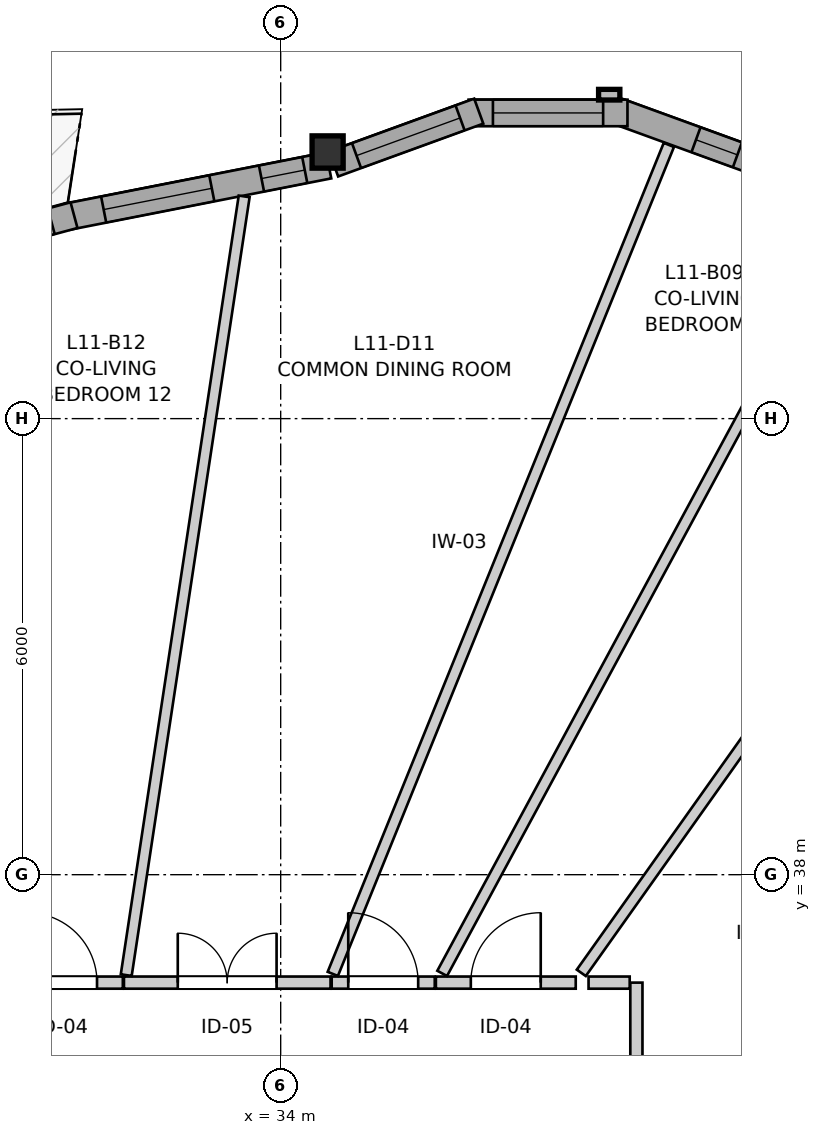
"""IFC4 building model, lengths in metres.
Left out: names, types, materials, properties, quantities, classifications, styles, units other than length and angle.
Written with IfcOpenShell. Run it as: python <this file> out.ifc"""

import sys

from ifc_helpers import new_model, si_unit, direction, frame, frame_2d, origin, origin_2d, place, context, subcontext, project, spatial, rectangle, i_section, extrude, source, transform, mapped, element, fill, save


model = new_model("IFC4")
c1 = context("Model", 3, precision=1e-05, world=origin(), true_north=direction((0.0, 1.0)))
c2 = subcontext(c1, "Body", "Model", "MODEL_VIEW")
j1 = project(units=[si_unit("LENGTHUNIT", "METRE"), si_unit("PLANEANGLEUNIT", "RADIAN")], contexts=[c1])
p1 = place(None, origin())
s1 = spatial("IfcSite", under=j1, at=p1, CompositionType="ELEMENT")
p2 = place(p1, origin())
s2 = spatial("IfcBuilding", under=s1, at=p2, CompositionType="ELEMENT")
p3 = place(p2, frame((0.0, 0.0, 39.8)))
s3 = spatial("IfcBuildingStorey", under=s2, at=p3, CompositionType="ELEMENT", Elevation=39.8)
m1 = source(origin(), c2, "Body", "SweptSolid", [
    extrude(i_section(OverallWidth=0.409, OverallDepth=0.425, WebThickness=0.03, FlangeThickness=0.048, FilletRadius=0.015, at=origin_2d()), origin(), (0.0, 0.0, 1.0), 2.94),
])
p4 = place(p3, frame((34.617, 47.508, 0.0), z_axis=(0.0, 0.0, 1.0), x_axis=(1.0, 0.0, 0.0)))
e1 = element("IfcColumn", 1, at=p4, inside=s3, PredefinedType="PILASTER", context=c2, shape_type="MappedRepresentation", body=[
    mapped(m1, transform((0.0, 0.0, 0.0), x_axis=(1.0, 0.0, 0.0), y_axis=(0.0, 1.0, 0.0), z_axis=(0.0, 0.0, 1.0), scale=1.0)),
])
p5 = place(p3, frame((40.393, 47.33, 0.0), z_axis=(0.0, 0.0, 1.0), x_axis=(-0.939660353162, 0.342108784886, 0.0)))
e2 = element("IfcWall", 2, at=p5, inside=s3, PredefinedType="SOLIDWALL", context=c2, shape_type="SweptSolid", body=[
    extrude(rectangle(XDim=2.09, YDim=0.35, at=frame_2d((1.045, 0.0))), origin(), (0.0, 0.0, 1.0), 2.42),
])
p6 = place(p5, frame((0.409, 0.0, 0.82)))
e3 = element("IfcOpeningElement", 3, at=p6, cuts=e2, PredefinedType="OPENING", context=c2, shape_type="SweptSolid", body=[
    extrude(rectangle(XDim=0.58, YDim=1.35, at=frame_2d((0.29, 0.675))), frame((0.0, 0.185, 0.0), z_axis=(0.0, -1.0, 0.0), x_axis=(1.0, 0.0, 0.0)), (0.0, 0.0, 1.0), 0.37),
])
p7 = place(p3, frame((38.563, 48.022, 0.0), z_axis=(0.0, 0.0, 1.0), x_axis=(-1.0, 0.0, 0.0)))
e4 = element("IfcWall", 4, at=p7, inside=s3, PredefinedType="SOLIDWALL", context=c2, shape_type="SweptSolid", body=[
    extrude(rectangle(XDim=2.09, YDim=0.35, at=frame_2d((1.045, 0.0))), origin(), (0.0, 0.0, 1.0), 2.42),
])
p8 = place(p7, frame((0.32, 0.0, 0.82)))
e5 = element("IfcOpeningElement", 5, at=p8, cuts=e4, PredefinedType="OPENING", context=c2, shape_type="SweptSolid", body=[
    extrude(rectangle(XDim=1.45, YDim=1.25, at=frame_2d((0.725, 0.625))), frame((0.0, 0.185, 0.0), z_axis=(0.0, -1.0, 0.0), x_axis=(1.0, 0.0, 0.0)), (0.0, 0.0, 1.0), 0.37),
])
p9 = place(p3, frame((36.606, 48.045, 0.0), z_axis=(0.0, 0.0, 1.0), x_axis=(-0.939653047052, -0.342128851701, 0.0)))
e6 = element("IfcWall", 6, at=p9, inside=s3, PredefinedType="SOLIDWALL", context=c2, shape_type="SweptSolid", body=[
    extrude(rectangle(XDim=2.032, YDim=0.35, at=frame_2d((1.016, 0.0))), origin(), (0.0, 0.0, 1.0), 2.42),
])
p10 = place(p9, frame((0.261, 0.0, 0.82)))
e7 = element("IfcOpeningElement", 7, at=p10, cuts=e6, PredefinedType="OPENING", context=c2, shape_type="SweptSolid", body=[
    extrude(rectangle(XDim=1.45, YDim=1.25, at=frame_2d((0.725, 0.625))), frame((0.0, 0.185, 0.0), z_axis=(0.0, -1.0, 0.0), x_axis=(1.0, 0.0, 0.0)), (0.0, 0.0, 1.0), 0.37),
])
p11 = place(p3, frame((34.632, 47.332, 0.0), z_axis=(0.0, 0.0, 1.0), x_axis=(-0.981234691866, -0.192817217796, 0.0)))
e8 = element("IfcWall", 8, at=p11, inside=s3, PredefinedType="SOLIDWALL", context=c2, shape_type="SweptSolid", body=[
    extrude(rectangle(XDim=3.502, YDim=0.35, at=frame_2d((1.751, 0.0))), origin(), (0.0, 0.0, 1.0), 2.42),
])
p12 = place(p11, frame((0.321, 0.0, 0.82)))
e9 = element("IfcOpeningElement", 9, at=p12, cuts=e8, PredefinedType="OPENING", context=c2, shape_type="SweptSolid", body=[
    extrude(rectangle(XDim=0.58, YDim=1.35, at=frame_2d((0.29, 0.675))), frame((0.0, 0.185, 0.0), z_axis=(0.0, -1.0, 0.0), x_axis=(1.0, 0.0, 0.0)), (0.0, 0.0, 1.0), 0.37),
])
p13 = place(p11, frame((1.567, 0.0, 0.82)))
e10 = element("IfcOpeningElement", 10, at=p13, cuts=e8, PredefinedType="OPENING", context=c2, shape_type="SweptSolid", body=[
    extrude(rectangle(XDim=1.45, YDim=1.25, at=frame_2d((0.725, 0.625))), frame((0.0, 0.185, 0.0), z_axis=(0.0, -1.0, 0.0), x_axis=(1.0, 0.0, 0.0)), (0.0, 0.0, 1.0), 0.37),
])
p14 = place(p3, frame((31.281, 46.677, 0.0), z_axis=(0.0, 0.0, 1.0), x_axis=(-0.965445661484, -0.260604441101, 0.0)))
e11 = element("IfcWall", 11, at=p14, inside=s3, PredefinedType="SOLIDWALL", context=c2, shape_type="SweptSolid", body=[
    extrude(rectangle(XDim=3.15, YDim=0.35, at=frame_2d((1.575, 0.0))), origin(), (0.0, 0.0, 1.0), 2.42),
])
p15 = place(p14, frame((0.31, 0.0, 0.82)))
e12 = element("IfcOpeningElement", 12, at=p15, cuts=e11, PredefinedType="OPENING", context=c2, shape_type="SweptSolid", body=[
    extrude(rectangle(XDim=0.58, YDim=1.35, at=frame_2d((0.29, 0.675))), frame((0.0, 0.185, 0.0), z_axis=(0.0, -1.0, 0.0), x_axis=(1.0, 0.0, 0.0)), (0.0, 0.0, 1.0), 0.37),
])
p16 = place(p14, frame((1.215, 0.0, 0.82)))
e13 = element("IfcOpeningElement", 13, at=p16, cuts=e11, PredefinedType="OPENING", context=c2, shape_type="SweptSolid", body=[
    extrude(rectangle(XDim=1.45, YDim=1.25, at=frame_2d((0.725, 0.625))), frame((0.0, 0.185, 0.0), z_axis=(0.0, -1.0, 0.0), x_axis=(1.0, 0.0, 0.0)), (0.0, 0.0, 1.0), 0.37),
])
p17 = place(p3, frame((38.68, 36.58, 0.0), z_axis=(0.0, 0.0, 1.0), x_axis=(0.0, -1.0, 0.0)))
e14 = element("IfcWall", 14, at=p17, inside=s3, PredefinedType="PARTITIONING", context=c2, shape_type="SweptSolid", body=[
    extrude(rectangle(XDim=3.069, YDim=0.16, at=frame_2d((1.535, 0.0))), origin(), (0.0, 0.0, 1.0), 2.94),
])
p18 = place(p17, frame((1.092, 0.0, 0.0)))
e15 = element("IfcOpeningElement", 15, at=p18, cuts=e14, PredefinedType="OPENING", context=c2, shape_type="SweptSolid", body=[
    extrude(rectangle(XDim=0.92, YDim=2.1, at=frame_2d((0.46, 1.05))), frame((0.0, 0.09, 0.0), z_axis=(0.0, -1.0, 0.0), x_axis=(1.0, 0.0, 0.0)), (0.0, 0.0, 1.0), 0.18),
])
p19 = place(p3, frame((31.938, 36.58, 0.0), z_axis=(0.0, 0.0, 1.0), x_axis=(1.0, 0.0, 0.0)))
e16 = element("IfcWall", 16, at=p19, inside=s3, PredefinedType="PARTITIONING", context=c2, shape_type="SweptSolid", body=[
    extrude(rectangle(XDim=2.718, YDim=0.16, at=frame_2d((1.359, 0.0))), origin(), (0.0, 0.0, 1.0), 2.94),
])
p20 = place(p19, frame((0.708, 0.0, 0.0)))
e17 = element("IfcOpeningElement", 17, at=p20, cuts=e16, PredefinedType="OPENING", context=c2, shape_type="SweptSolid", body=[
    extrude(rectangle(XDim=1.3, YDim=2.1, at=frame_2d((0.65, 1.05))), frame((0.0, 0.09, 0.0), z_axis=(0.0, -1.0, 0.0), x_axis=(1.0, 0.0, 0.0)), (0.0, 0.0, 1.0), 0.18),
])
p21 = place(p3, frame((36.042, 36.58, 0.0), z_axis=(0.0, 0.0, 1.0), x_axis=(1.0, 0.0, 0.0)))
e18 = element("IfcWall", 18, at=p21, inside=s3, PredefinedType="PARTITIONING", context=c2, shape_type="SweptSolid", body=[
    extrude(rectangle(XDim=1.84, YDim=0.16, at=frame_2d((0.92, 0.0))), origin(), (0.0, 0.0, 1.0), 2.94),
])
p22 = place(p21, frame((0.459, 0.0, 0.0)))
e19 = element("IfcOpeningElement", 19, at=p22, cuts=e18, PredefinedType="OPENING", context=c2, shape_type="SweptSolid", body=[
    extrude(rectangle(XDim=0.92, YDim=2.1, at=frame_2d((0.46, 1.05))), frame((0.0, 0.09, 0.0), z_axis=(0.0, -1.0, 0.0), x_axis=(1.0, 0.0, 0.0)), (0.0, 0.0, 1.0), 0.18),
])
p23 = place(p3, frame((30.324, 36.58, 0.0), z_axis=(0.0, 0.0, 1.0), x_axis=(1.0, 0.0, 0.0)))
e20 = element("IfcWall", 20, at=p23, inside=s3, PredefinedType="PARTITIONING", context=c2, shape_type="SweptSolid", body=[
    extrude(rectangle(XDim=1.599, YDim=0.16, at=frame_2d((0.8, 0.0))), origin(), (0.0, 0.0, 1.0), 2.94),
])
p24 = place(p23, frame((0.34, 0.0, 0.0)))
e21 = element("IfcOpeningElement", 21, at=p24, cuts=e20, PredefinedType="OPENING", context=c2, shape_type="SweptSolid", body=[
    extrude(rectangle(XDim=0.92, YDim=2.1, at=frame_2d((0.46, 1.05))), frame((0.0, 0.09, 0.0), z_axis=(0.0, -1.0, 0.0), x_axis=(1.0, 0.0, 0.0)), (0.0, 0.0, 1.0), 0.18),
])
p25 = place(p3, frame((34.671, 36.58, 0.0), z_axis=(0.0, 0.0, 1.0), x_axis=(1.0, 0.0, 0.0)))
e22 = element("IfcWall", 22, at=p25, inside=s3, PredefinedType="PARTITIONING", context=c2, shape_type="SweptSolid", body=[
    extrude(rectangle(XDim=1.356, YDim=0.16, at=frame_2d((0.678, 0.0))), origin(), (0.0, 0.0, 1.0), 2.94),
])
p26 = place(p25, frame((0.218, 0.0, 0.0)))
e23 = element("IfcOpeningElement", 23, at=p26, cuts=e22, PredefinedType="OPENING", context=c2, shape_type="SweptSolid", body=[
    extrude(rectangle(XDim=0.92, YDim=2.1, at=frame_2d((0.46, 1.05))), frame((0.0, 0.09, 0.0), z_axis=(0.0, -1.0, 0.0), x_axis=(1.0, 0.0, 0.0)), (0.0, 0.0, 1.0), 0.18),
])
p27 = place(p3, frame((34.686, 36.695, 0.0), z_axis=(0.0, 0.0, 1.0), x_axis=(0.375735926904, 0.926726773776, 0.0)))
e24 = element("IfcWall", 24, at=p27, inside=s3, PredefinedType="PARTITIONING", context=c2, shape_type="SweptSolid", body=[
    extrude(rectangle(XDim=11.769, YDim=0.145, at=frame_2d((5.884, 0.0))), origin(), (0.0, 0.0, 1.0), 2.94),
])
p28 = place(p3, frame((36.125, 36.701, 0.0), z_axis=(0.0, 0.0, 1.0), x_axis=(0.474948586069, 0.880013545686, 0.0)))
e25 = element("IfcWall", 25, at=p28, inside=s3, PredefinedType="PARTITIONING", context=c2, shape_type="SweptSolid", body=[
    extrude(rectangle(XDim=10.889, YDim=0.145, at=frame_2d((5.445, 0.0))), origin(), (0.0, 0.0, 1.0), 2.94),
])
p29 = place(p3, frame((31.968, 36.679, 0.0), z_axis=(0.0, 0.0, 1.0), x_axis=(0.149735581821, 0.9887260771, 0.0)))
e26 = element("IfcWall", 26, at=p29, inside=s3, PredefinedType="PARTITIONING", context=c2, shape_type="SweptSolid", body=[
    extrude(rectangle(XDim=10.362, YDim=0.145, at=frame_2d((5.181, 0.0))), origin(), (0.0, 0.0, 1.0), 2.94),
])
p30 = place(p3, frame((37.955, 36.708, 0.0), z_axis=(0.0, 0.0, 1.0), x_axis=(0.578991718582, 0.81533342248, 0.0)))
e27 = element("IfcWall", 27, at=p30, inside=s3, PredefinedType="PARTITIONING", context=c2, shape_type="SweptSolid", body=[
    extrude(rectangle(XDim=8.325, YDim=0.145, at=frame_2d((4.163, 0.0))), origin(), (0.0, 0.0, 1.0), 2.94),
])
p31 = place(p3, frame((38.814, 33.597, 0.0), z_axis=(0.0, 0.0, 1.0), x_axis=(0.74417856937, 0.667980730927, 0.0)))
e28 = element("IfcWall", 28, at=p31, inside=s3, PredefinedType="PARTITIONING", context=c2, shape_type="SweptSolid", body=[
    extrude(rectangle(XDim=4.005, YDim=0.145, at=frame_2d((2.002, 0.0))), origin(), (0.0, 0.0, 1.0), 2.94),
])
p32 = place(p3, frame((38.051, 36.58, 0.0), z_axis=(0.0, 0.0, 1.0), x_axis=(1.0, 0.0, 0.0)))
e29 = element("IfcWall", 29, at=p32, inside=s3, PredefinedType="PARTITIONING", context=c2, shape_type="SweptSolid", body=[
    extrude(rectangle(XDim=0.541, YDim=0.16, at=frame_2d((0.271, 0.0))), origin(), (0.0, 0.0, 1.0), 2.94),
])
m2 = source(origin(), c2, "Body", "SweptSolid", [
    extrude(rectangle(XDim=0.58, YDim=1.35, at=frame_2d((0.29, 0.675))), frame((0.0, 0.03, 0.0), z_axis=(0.0, -1.0, 0.0), x_axis=(1.0, 0.0, 0.0)), (0.0, 0.0, 1.0), 0.06),
])
p33 = place(p6, origin())
e30 = element("IfcWindow", 30, at=p33, inside=s3, PartitioningType="SINGLE_PANEL", PredefinedType="WINDOW", context=c2, shape_type="MappedRepresentation", body=[
    mapped(m2, transform((0.0, 0.0, 0.0), x_axis=(1.0, 0.0, 0.0), y_axis=(0.0, 1.0, 0.0), z_axis=(0.0, 0.0, 1.0), scale=1.0)),
])
fill(e3, e30)
m3 = source(origin(), c2, "Body", "SweptSolid", [
    extrude(rectangle(XDim=1.45, YDim=1.25, at=frame_2d((0.725, 0.625))), frame((0.0, 0.03, 0.0), z_axis=(0.0, -1.0, 0.0), x_axis=(1.0, 0.0, 0.0)), (0.0, 0.0, 1.0), 0.06),
])
p34 = place(p8, origin())
e31 = element("IfcWindow", 31, at=p34, inside=s3, PartitioningType="SINGLE_PANEL", PredefinedType="WINDOW", context=c2, shape_type="MappedRepresentation", body=[
    mapped(m3, transform((0.0, 0.0, 0.0), x_axis=(1.0, 0.0, 0.0), y_axis=(0.0, 1.0, 0.0), z_axis=(0.0, 0.0, 1.0), scale=1.0)),
])
fill(e5, e31)
p35 = place(p10, origin())
e32 = element("IfcWindow", 32, at=p35, inside=s3, PartitioningType="SINGLE_PANEL", PredefinedType="WINDOW", context=c2, shape_type="MappedRepresentation", body=[
    mapped(m3, transform((0.0, 0.0, 0.0), x_axis=(1.0, 0.0, 0.0), y_axis=(0.0, 1.0, 0.0), z_axis=(0.0, 0.0, 1.0), scale=1.0)),
])
fill(e7, e32)
p36 = place(p12, origin())
e33 = element("IfcWindow", 33, at=p36, inside=s3, PartitioningType="SINGLE_PANEL", PredefinedType="WINDOW", context=c2, shape_type="MappedRepresentation", body=[
    mapped(m2, transform((0.0, 0.0, 0.0), x_axis=(1.0, 0.0, 0.0), y_axis=(0.0, 1.0, 0.0), z_axis=(0.0, 0.0, 1.0), scale=1.0)),
])
fill(e9, e33)
p37 = place(p13, origin())
e34 = element("IfcWindow", 34, at=p37, inside=s3, PartitioningType="SINGLE_PANEL", PredefinedType="WINDOW", context=c2, shape_type="MappedRepresentation", body=[
    mapped(m3, transform((0.0, 0.0, 0.0), x_axis=(1.0, 0.0, 0.0), y_axis=(0.0, 1.0, 0.0), z_axis=(0.0, 0.0, 1.0), scale=1.0)),
])
fill(e10, e34)
m4 = source(origin(), c2, "Body", "SweptSolid", [
    extrude(rectangle(XDim=1.3, YDim=2.1, at=frame_2d((0.65, 1.05))), frame((0.0, 0.025, 0.0), z_axis=(0.0, -1.0, 0.0), x_axis=(1.0, 0.0, 0.0)), (0.0, 0.0, 1.0), 0.05),
])
p38 = place(p20, origin())
e35 = element("IfcDoor", 35, at=p38, inside=s3, OperationType="DOUBLE_DOOR_SINGLE_SWING", PredefinedType="DOOR", context=c2, shape_type="MappedRepresentation", body=[
    mapped(m4, transform((0.0, 0.0, 0.0), x_axis=(1.0, 0.0, 0.0), y_axis=(0.0, 1.0, 0.0), z_axis=(0.0, 0.0, 1.0), scale=1.0)),
])
fill(e17, e35)
m5 = source(origin(), c2, "Body", "SweptSolid", [
    extrude(rectangle(XDim=0.92, YDim=2.1, at=frame_2d((0.46, 1.05))), frame((0.0, 0.025, 0.0), z_axis=(0.0, -1.0, 0.0), x_axis=(1.0, 0.0, 0.0)), (0.0, 0.0, 1.0), 0.05),
])
p39 = place(p22, origin())
e36 = element("IfcDoor", 36, at=p39, inside=s3, OperationType="SINGLE_SWING_RIGHT", PredefinedType="DOOR", context=c2, shape_type="MappedRepresentation", body=[
    mapped(m5, transform((0.0, 0.0, 0.0), x_axis=(1.0, 0.0, 0.0), y_axis=(0.0, 1.0, 0.0), z_axis=(0.0, 0.0, 1.0), scale=1.0)),
])
fill(e19, e36)
p40 = place(p24, origin())
e37 = element("IfcDoor", 37, at=p40, inside=s3, OperationType="SINGLE_SWING_LEFT", PredefinedType="DOOR", context=c2, shape_type="MappedRepresentation", body=[
    mapped(m5, transform((0.0, 0.0, 0.0), x_axis=(1.0, 0.0, 0.0), y_axis=(0.0, 1.0, 0.0), z_axis=(0.0, 0.0, 1.0), scale=1.0)),
])
fill(e21, e37)
p41 = place(p26, origin())
e38 = element("IfcDoor", 38, at=p41, inside=s3, OperationType="SINGLE_SWING_LEFT", PredefinedType="DOOR", context=c2, shape_type="MappedRepresentation", body=[
    mapped(m5, transform((0.0, 0.0, 0.0), x_axis=(1.0, 0.0, 0.0), y_axis=(0.0, 1.0, 0.0), z_axis=(0.0, 0.0, 1.0), scale=1.0)),
])
fill(e23, e38)
save(model, sys.argv[1])
